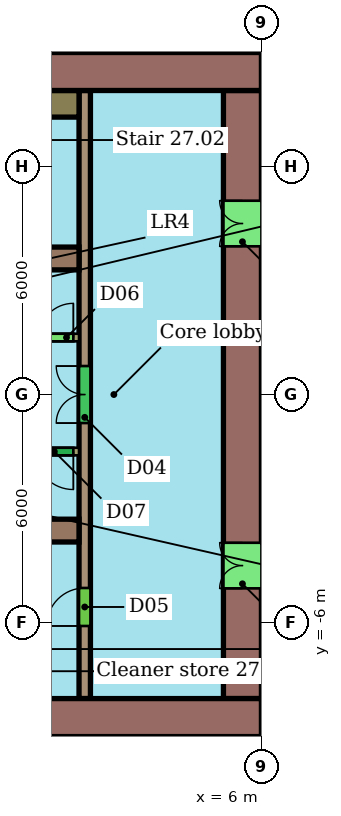
"""IFC4 building model, lengths in metres.
Left out: names, types, materials, properties, quantities, classifications, styles, units other than length and angle.
Written with IfcOpenShell. Run it as: python <this file> out.ifc"""

import sys

from ifc_helpers import new_model, si_unit, direction, frame, frame_2d, origin, place, context, subcontext, project, spatial, rectangle, extrude, element, fill, save


model = new_model("IFC4")
c1 = context("Model", 3, precision=1e-05, world=origin(), true_north=direction((0.0, 1.0)))
c2 = subcontext(c1, "Body", "Model", "MODEL_VIEW")
j1 = project(units=[si_unit("LENGTHUNIT", "METRE"), si_unit("PLANEANGLEUNIT", "RADIAN")], contexts=[c1])
p1 = place(None, origin())
s1 = spatial("IfcSite", under=j1, at=p1, CompositionType="ELEMENT")
p2 = place(p1, origin())
s2 = spatial("IfcBuilding", under=s1, at=p2, CompositionType="ELEMENT")
p3 = place(p2, frame((0.0, 0.0, 117.4)))
s3 = spatial("IfcBuildingStorey", under=s2, at=p3, CompositionType="ELEMENT", Elevation=117.4)
p4 = place(p3, frame((6.0, 8.5, 0.0), z_axis=(0.0, 0.0, 1.0), x_axis=(-1.0, 0.0, 0.0)))
e1 = element("IfcWall", 1, at=p4, inside=s3, PredefinedType="SHEAR", context=c2, shape_type="SweptSolid", body=[
    extrude(rectangle(XDim=12.0, YDim=1.0, at=frame_2d((6.0, 0.0))), origin(), (0.0, 0.0, 1.0), 3.3),
])
p5 = place(p4, frame((5.6, 0.0, 0.0)))
e2 = element("IfcOpeningElement", 2, at=p5, cuts=e1, PredefinedType="OPENING", context=c2, shape_type="SweptSolid", body=[
    extrude(rectangle(XDim=1.2, YDim=2.1, at=frame_2d((0.6, 1.05))), frame((0.0, 0.51, 0.0), z_axis=(0.0, -1.0, 0.0), x_axis=(1.0, 0.0, 0.0)), (0.0, 0.0, 1.0), 1.02),
])
p6 = place(p3, frame((-18.0, -8.5, 0.0), z_axis=(0.0, 0.0, 1.0), x_axis=(1.0, 0.0, 0.0)))
e3 = element("IfcWall", 3, at=p6, inside=s3, PredefinedType="SHEAR", context=c2, shape_type="SweptSolid", body=[
    extrude(rectangle(XDim=24.0, YDim=1.0, at=frame_2d((12.0, 0.0))), origin(), (0.0, 0.0, 1.0), 3.3),
])
p7 = place(p6, frame((6.0, 0.0, 0.0)))
e4 = element("IfcOpeningElement", 4, at=p7, cuts=e3, PredefinedType="OPENING", context=c2, shape_type="SweptSolid", body=[
    extrude(rectangle(XDim=1.2, YDim=2.1, at=frame_2d((0.6, 1.05))), frame((0.0, 0.51, 0.0), z_axis=(0.0, -1.0, 0.0), x_axis=(1.0, 0.0, 0.0)), (0.0, 0.0, 1.0), 1.02),
])
p8 = place(p3, frame((5.5, -8.0, 0.0), z_axis=(0.0, 0.0, 1.0), x_axis=(0.0, 1.0, 0.0)))
e5 = element("IfcWall", 5, at=p8, inside=s3, PredefinedType="SHEAR", context=c2, shape_type="SweptSolid", body=[
    extrude(rectangle(XDim=16.0, YDim=1.0, at=frame_2d((8.0, 0.0))), origin(), (0.0, 0.0, 1.0), 3.3),
])
p9 = place(p8, frame((2.9, 0.0, 0.0)))
e6 = element("IfcOpeningElement", 6, at=p9, cuts=e5, PredefinedType="OPENING", context=c2, shape_type="SweptSolid", body=[
    extrude(rectangle(XDim=1.2, YDim=2.1, at=frame_2d((0.6, 1.05))), frame((0.0, 0.51, 0.0), z_axis=(0.0, -1.0, 0.0), x_axis=(1.0, 0.0, 0.0)), (0.0, 0.0, 1.0), 1.02),
])
p10 = place(p8, frame((11.9, 0.0, 0.0)))
e7 = element("IfcOpeningElement", 7, at=p10, cuts=e5, PredefinedType="OPENING", context=c2, shape_type="SweptSolid", body=[
    extrude(rectangle(XDim=1.2, YDim=2.1, at=frame_2d((0.6, 1.05))), frame((0.0, 0.51, 0.0), z_axis=(0.0, -1.0, 0.0), x_axis=(1.0, 0.0, 0.0)), (0.0, 0.0, 1.0), 1.02),
])
for number, where, z_axis, x_axis in (
    (8, (-6.0, 3.58, 0.0), (0.0, 0.0, 1.0), (1.0, 0.0, 0.0)),
    (9, (-6.0, -3.58, 0.0), (0.0, 0.0, 1.0), (1.0, 0.0, 0.0)),
):
    element("IfcWall", number, at=place(p3, frame(where, z_axis=z_axis, x_axis=x_axis)), inside=s3, PredefinedType="SHEAR", context=c2, shape_type="SweptSolid", body=[
        extrude(rectangle(XDim=7.2, YDim=0.6, at=frame_2d((3.6, 0.0))), origin(), (0.0, 0.0, 1.0), 3.3),
    ])
p11 = place(p3, frame((1.35, -8.0, 0.0), z_axis=(0.0, 0.0, 1.0), x_axis=(0.0, 1.0, 0.0)))
e10 = element("IfcWall", 10, at=p11, inside=s3, PredefinedType="SHEAR", context=c2, shape_type="SweptSolid", body=[
    extrude(rectangle(XDim=16.0, YDim=0.3, at=frame_2d((8.0, 0.0))), origin(), (0.0, 0.0, 1.0), 3.3),
])
p12 = place(p11, frame((1.91, 0.0, 0.0)))
e11 = element("IfcOpeningElement", 11, at=p12, cuts=e10, PredefinedType="OPENING", context=c2, shape_type="SweptSolid", body=[
    extrude(rectangle(XDim=1.0, YDim=2.1, at=frame_2d((0.5, 1.05))), frame((0.0, 0.16, 0.0), z_axis=(0.0, -1.0, 0.0), x_axis=(1.0, 0.0, 0.0)), (0.0, 0.0, 1.0), 0.32),
])
p13 = place(p11, frame((7.25, 0.0, 0.0)))
e12 = element("IfcOpeningElement", 12, at=p13, cuts=e10, PredefinedType="OPENING", context=c2, shape_type="SweptSolid", body=[
    extrude(rectangle(XDim=1.5, YDim=2.1, at=frame_2d((0.75, 1.05))), frame((0.0, 0.16, 0.0), z_axis=(0.0, -1.0, 0.0), x_axis=(1.0, 0.0, 0.0)), (0.0, 0.0, 1.0), 0.32),
])
p14 = place(p3, frame((-13.2, 1.5, 0.0), z_axis=(0.0, 0.0, 1.0), x_axis=(1.0, 0.0, 0.0)))
e13 = element("IfcWall", 13, at=p14, inside=s3, PredefinedType="SHEAR", context=c2, shape_type="SweptSolid", body=[
    extrude(rectangle(XDim=14.4, YDim=0.2, at=frame_2d((7.2, 0.0))), origin(), (0.0, 0.0, 1.0), 3.3),
])
p15 = place(p14, frame((0.546, 0.0, 0.0)))
e14 = element("IfcOpeningElement", 14, at=p15, cuts=e13, PredefinedType="OPENING", context=c2, shape_type="SweptSolid", body=[
    extrude(rectangle(XDim=1.1, YDim=2.1, at=frame_2d((0.55, 1.05))), frame((0.0, 0.11, 0.0), z_axis=(0.0, -1.0, 0.0), x_axis=(1.0, 0.0, 0.0)), (0.0, 0.0, 1.0), 0.22),
])
p16 = place(p14, frame((2.988, 0.0, 0.0)))
e15 = element("IfcOpeningElement", 15, at=p16, cuts=e13, PredefinedType="OPENING", context=c2, shape_type="SweptSolid", body=[
    extrude(rectangle(XDim=1.1, YDim=2.1, at=frame_2d((0.55, 1.05))), frame((0.0, 0.11, 0.0), z_axis=(0.0, -1.0, 0.0), x_axis=(1.0, 0.0, 0.0)), (0.0, 0.0, 1.0), 0.22),
])
p17 = place(p14, frame((5.429, 0.0, 0.0)))
e16 = element("IfcOpeningElement", 16, at=p17, cuts=e13, PredefinedType="OPENING", context=c2, shape_type="SweptSolid", body=[
    extrude(rectangle(XDim=1.1, YDim=2.1, at=frame_2d((0.55, 1.05))), frame((0.0, 0.11, 0.0), z_axis=(0.0, -1.0, 0.0), x_axis=(1.0, 0.0, 0.0)), (0.0, 0.0, 1.0), 0.22),
])
p18 = place(p14, frame((7.871, 0.0, 0.0)))
e17 = element("IfcOpeningElement", 17, at=p18, cuts=e13, PredefinedType="OPENING", context=c2, shape_type="SweptSolid", body=[
    extrude(rectangle(XDim=1.1, YDim=2.1, at=frame_2d((0.55, 1.05))), frame((0.0, 0.11, 0.0), z_axis=(0.0, -1.0, 0.0), x_axis=(1.0, 0.0, 0.0)), (0.0, 0.0, 1.0), 0.22),
])
p19 = place(p14, frame((10.958, 0.0, 0.0)))
e18 = element("IfcOpeningElement", 18, at=p19, cuts=e13, PredefinedType="OPENING", context=c2, shape_type="SweptSolid", body=[
    extrude(rectangle(XDim=0.9, YDim=2.1, at=frame_2d((0.45, 1.05))), frame((0.0, 0.11, 0.0), z_axis=(0.0, -1.0, 0.0), x_axis=(1.0, 0.0, 0.0)), (0.0, 0.0, 1.0), 0.22),
])
p20 = place(p14, frame((13.35, 0.0, 0.0)))
e19 = element("IfcOpeningElement", 19, at=p20, cuts=e13, PredefinedType="OPENING", context=c2, shape_type="SweptSolid", body=[
    extrude(rectangle(XDim=0.9, YDim=2.1, at=frame_2d((0.45, 1.05))), frame((0.0, 0.11, 0.0), z_axis=(0.0, -1.0, 0.0), x_axis=(1.0, 0.0, 0.0)), (0.0, 0.0, 1.0), 0.22),
])
p21 = place(p3, frame((1.2, -1.5, 0.0), z_axis=(0.0, 0.0, 1.0), x_axis=(-1.0, 0.0, 0.0)))
e20 = element("IfcWall", 20, at=p21, inside=s3, PredefinedType="SHEAR", context=c2, shape_type="SweptSolid", body=[
    extrude(rectangle(XDim=14.4, YDim=0.2, at=frame_2d((7.2, 0.0))), origin(), (0.0, 0.0, 1.0), 3.3),
])
p22 = place(p21, frame((7.821, 0.0, 0.0)))
e21 = element("IfcOpeningElement", 21, at=p22, cuts=e20, PredefinedType="OPENING", context=c2, shape_type="SweptSolid", body=[
    extrude(rectangle(XDim=1.2, YDim=2.1, at=frame_2d((0.6, 1.05))), frame((0.0, 0.11, 0.0), z_axis=(0.0, -1.0, 0.0), x_axis=(1.0, 0.0, 0.0)), (0.0, 0.0, 1.0), 0.22),
])
p23 = place(p21, frame((0.15, 0.0, 0.0)))
e22 = element("IfcOpeningElement", 22, at=p23, cuts=e20, PredefinedType="OPENING", context=c2, shape_type="SweptSolid", body=[
    extrude(rectangle(XDim=1.0, YDim=2.1, at=frame_2d((0.5, 1.05))), frame((0.0, 0.11, 0.0), z_axis=(0.0, -1.0, 0.0), x_axis=(1.0, 0.0, 0.0)), (0.0, 0.0, 1.0), 0.22),
])
p24 = place(p3, frame((0.4, 7.65, 0.0), z_axis=(0.0, 0.0, 1.0), x_axis=(1.0, 0.0, 0.0)))
e23 = element("IfcWall", 23, at=p24, inside=s3, PredefinedType="SHEAR", context=c2, shape_type="SweptSolid", body=[
    extrude(rectangle(XDim=0.8, YDim=0.7, at=frame_2d((0.4, 0.0))), origin(), (0.0, 0.0, 1.0), 3.3),
])
p25 = place(p9, origin())
e24 = element("IfcDoor", 24, at=p25, inside=s3, OperationType="DOUBLE_DOOR_SINGLE_SWING", PredefinedType="NOTDEFINED", context=c2, shape_type="SweptSolid", body=[
    extrude(rectangle(XDim=1.2, YDim=2.1, at=frame_2d((0.6, 1.05))), frame((0.0, 0.025, 0.0), z_axis=(0.0, -1.0, 0.0), x_axis=(1.0, 0.0, 0.0)), (0.0, 0.0, 1.0), 0.05),
])
fill(e6, e24)
p26 = place(p10, origin())
e25 = element("IfcDoor", 25, at=p26, inside=s3, OperationType="DOUBLE_DOOR_SINGLE_SWING", PredefinedType="NOTDEFINED", context=c2, shape_type="SweptSolid", body=[
    extrude(rectangle(XDim=1.2, YDim=2.1, at=frame_2d((0.6, 1.05))), frame((0.0, 0.025, 0.0), z_axis=(0.0, -1.0, 0.0), x_axis=(1.0, 0.0, 0.0)), (0.0, 0.0, 1.0), 0.05),
])
fill(e7, e25)
p27 = place(p12, origin())
e26 = element("IfcDoor", 26, at=p27, inside=s3, OperationType="SINGLE_SWING_LEFT", PredefinedType="NOTDEFINED", context=c2, shape_type="SweptSolid", body=[
    extrude(rectangle(XDim=1.0, YDim=2.1, at=frame_2d((0.5, 1.05))), frame((0.0, 0.025, 0.0), z_axis=(0.0, -1.0, 0.0), x_axis=(1.0, 0.0, 0.0)), (0.0, 0.0, 1.0), 0.05),
])
fill(e11, e26)
p28 = place(p13, origin())
e27 = element("IfcDoor", 27, at=p28, inside=s3, OperationType="DOUBLE_DOOR_SINGLE_SWING", PredefinedType="NOTDEFINED", context=c2, shape_type="SweptSolid", body=[
    extrude(rectangle(XDim=1.5, YDim=2.1, at=frame_2d((0.75, 1.05))), frame((0.0, 0.025, 0.0), z_axis=(0.0, -1.0, 0.0), x_axis=(1.0, 0.0, 0.0)), (0.0, 0.0, 1.0), 0.05),
])
fill(e12, e27)
p29 = place(p20, origin())
e28 = element("IfcDoor", 28, at=p29, inside=s3, OperationType="SINGLE_SWING_RIGHT", PredefinedType="NOTDEFINED", context=c2, shape_type="SweptSolid", body=[
    extrude(rectangle(XDim=0.9, YDim=2.1, at=frame_2d((0.45, 1.05))), frame((0.0, 0.025, 0.0), z_axis=(0.0, -1.0, 0.0), x_axis=(1.0, 0.0, 0.0)), (0.0, 0.0, 1.0), 0.05),
])
fill(e19, e28)
p30 = place(p23, origin())
e29 = element("IfcDoor", 29, at=p30, inside=s3, OperationType="SINGLE_SWING_LEFT", PredefinedType="NOTDEFINED", context=c2, shape_type="SweptSolid", body=[
    extrude(rectangle(XDim=1.0, YDim=2.1, at=frame_2d((0.5, 1.05))), frame((0.0, 0.025, 0.0), z_axis=(0.0, -1.0, 0.0), x_axis=(1.0, 0.0, 0.0)), (0.0, 0.0, 1.0), 0.05),
])
fill(e22, e29)
save(model, sys.argv[1])
